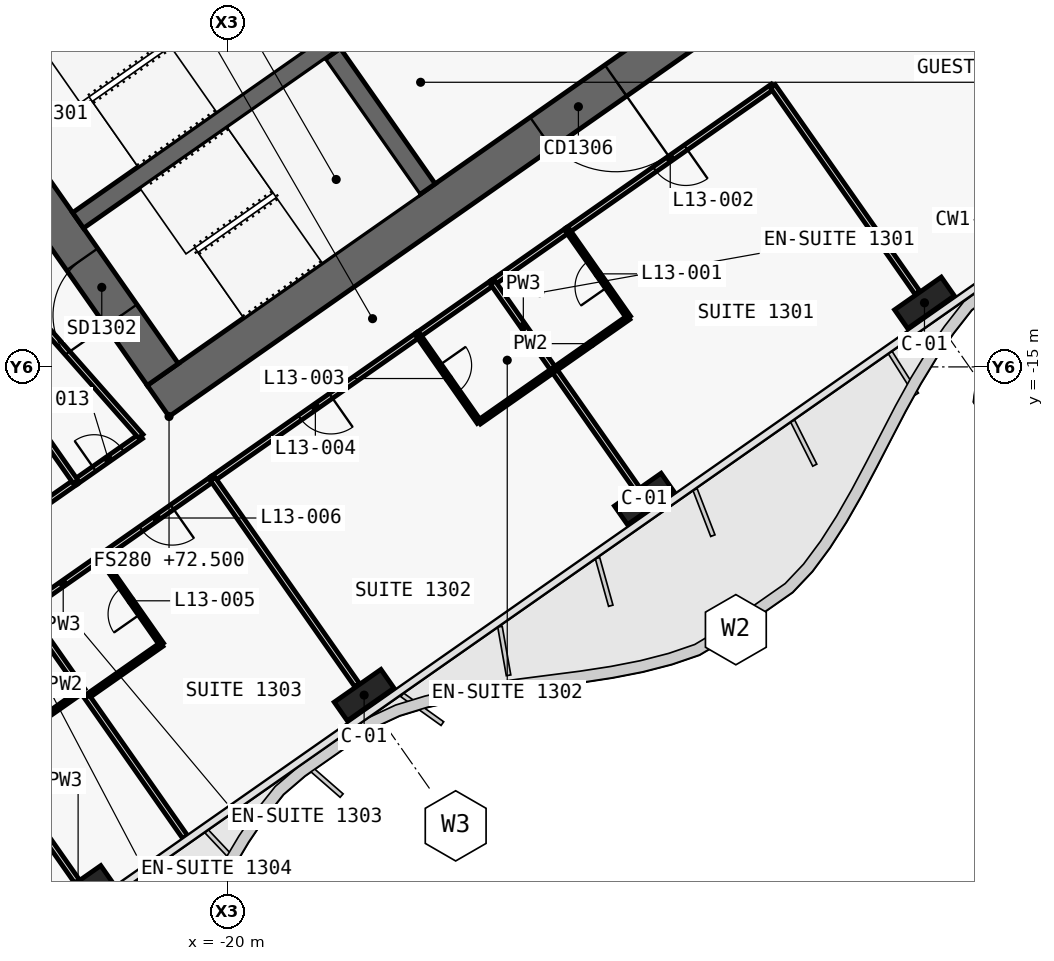
"""IFC4 building model, lengths in metres.
Left out: names, types, materials, properties, quantities, classifications, styles, units other than length and angle.
Written with IfcOpenShell. Run it as: python <this file> out.ifc"""

import sys

from ifc_helpers import new_model, si_unit, direction, frame, frame_2d, origin, origin_2d, place, context, subcontext, project, spatial, polyline, rectangle, outline, extrude, element, fill, save


model = new_model("IFC4")
c1 = context("Model", 3, precision=1e-05, world=origin(), true_north=direction((0.0, 1.0)))
c2 = subcontext(c1, "Body", "Model", "MODEL_VIEW")
j1 = project(units=[si_unit("LENGTHUNIT", "METRE"), si_unit("PLANEANGLEUNIT", "RADIAN")], contexts=[c1])
p1 = place(None, origin())
s1 = spatial("IfcSite", under=j1, at=p1, CompositionType="ELEMENT")
p2 = place(p1, origin())
s2 = spatial("IfcBuilding", under=s1, at=p2, CompositionType="ELEMENT")
p3 = place(p2, frame((0.0, 0.0, 72.5)))
s3 = spatial("IfcBuildingStorey", under=s2, at=p3, CompositionType="ELEMENT", Elevation=72.5)
p4 = place(p3, frame((0.037, 11.867, 0.0), z_axis=(0.0, 0.0, 1.0), x_axis=(-0.819155306259, -0.573571777746, 0.0)))
e1 = element("IfcWall", 1, at=p4, inside=s3, PredefinedType="SHEAR", context=c2, shape_type="SweptSolid", body=[
    extrude(outline(polyline([(33.837, 0.5), (0.7, 0.5), (0.0, -0.5), (33.837, -0.5), (33.837, 0.5)])), origin(), (0.0, 0.0, 1.0), 3.6),
])
p5 = place(p3, frame((0.037, -0.585, 0.0), z_axis=(0.0, 0.0, 1.0), x_axis=(-0.819157152511, -0.573569140985, 0.0)))
e2 = element("IfcWall", 2, at=p5, inside=s3, PredefinedType="SHEAR", context=c2, shape_type="SweptSolid", body=[
    extrude(outline(polyline([(26.695, 0.5), (0.7, 0.5), (0.0, -0.5), (26.695, -0.5), (26.695, 0.5)])), origin(), (0.0, 0.0, 1.0), 3.6),
])
p6 = place(p5, frame((2.995, 0.0, 0.0)))
e3 = element("IfcOpeningElement", 3, at=p6, cuts=e2, PredefinedType="OPENING", context=c2, shape_type="SweptSolid", body=[
    extrude(rectangle(XDim=2.4, YDim=2.1, at=frame_2d((1.2, 1.05))), frame((0.0, 0.51, 0.0), z_axis=(0.0, -1.0, 0.0), x_axis=(1.0, 0.0, 0.0)), (0.0, 0.0, 1.0), 1.02),
])
p7 = place(p5, frame((11.995, 0.0, 0.0)))
e4 = element("IfcOpeningElement", 4, at=p7, cuts=e2, PredefinedType="OPENING", context=c2, shape_type="SweptSolid", body=[
    extrude(rectangle(XDim=2.4, YDim=2.1, at=frame_2d((1.2, 1.05))), frame((0.0, 0.51, 0.0), z_axis=(0.0, -1.0, 0.0), x_axis=(1.0, 0.0, 0.0)), (0.0, 0.0, 1.0), 1.02),
])
p8 = place(p3, frame((-21.708, -15.2, 0.0), z_axis=(0.0, 0.0, 1.0), x_axis=(-0.573576324356, 0.819152122709, 0.0)))
e5 = element("IfcWall", 5, at=p8, inside=s3, PredefinedType="SHEAR", context=c2, shape_type="SweptSolid", body=[
    extrude(outline(polyline([(0.0, 0.5), (0.0, -0.5), (9.2, -0.5), (9.2, 0.5), (0.0, 0.5)])), origin(), (0.0, 0.0, 1.0), 3.6),
])
p9 = place(p8, frame((6.1, 0.0, 0.0)))
e6 = element("IfcOpeningElement", 6, at=p9, cuts=e5, PredefinedType="OPENING", context=c2, shape_type="SweptSolid", body=[
    extrude(rectangle(XDim=1.8, YDim=2.1, at=frame_2d((0.9, 1.05))), frame((0.0, 0.51, 0.0), z_axis=(0.0, -1.0, 0.0), x_axis=(1.0, 0.0, 0.0)), (0.0, 0.0, 1.0), 1.02),
])
p10 = place(p8, frame((1.9, 0.0, 0.0)))
e7 = element("IfcOpeningElement", 7, at=p10, cuts=e5, PredefinedType="OPENING", context=c2, shape_type="SweptSolid", body=[
    extrude(rectangle(XDim=1.8, YDim=2.1, at=frame_2d((0.9, 1.05))), frame((0.0, 0.51, 0.0), z_axis=(0.0, -1.0, 0.0), x_axis=(1.0, 0.0, 0.0)), (0.0, 0.0, 1.0), 1.02),
])
p11 = place(p3, frame((-14.745, -10.324, 0.0), z_axis=(0.0, 0.0, 1.0), x_axis=(-0.57356780395, 0.819158088694, 0.0)))
e8 = element("IfcWall", 8, at=p11, inside=s3, PredefinedType="SHEAR", context=c2, shape_type="SweptSolid", body=[
    extrude(outline(polyline([(4.35, 0.25), (0.0, 0.25), (0.0, -0.25), (4.35, -0.25), (4.35, 0.25)])), origin(), (0.0, 0.0, 1.0), 3.6),
])
p12 = place(p3, frame((-2.638, 3.768, 0.0), z_axis=(0.0, 0.0, 1.0), x_axis=(-0.819148977158, -0.573580816643, 0.0)))
e9 = element("IfcWall", 9, at=p12, inside=s3, PredefinedType="SHEAR", context=c2, shape_type="SweptSolid", body=[
    extrude(outline(polyline([(26.0, 0.25), (0.0, 0.25), (0.0, -0.25), (26.0, -0.25), (26.0, 0.25)])), origin(), (0.0, 0.0, 1.0), 3.6),
])
p13 = place(p12, frame((1.169, 0.0, 0.0)))
e10 = element("IfcOpeningElement", 10, at=p13, cuts=e9, PredefinedType="OPENING", context=c2, shape_type="SweptSolid", body=[
    extrude(rectangle(XDim=1.1, YDim=2.1, at=frame_2d((0.55, 1.05))), frame((0.0, 0.26, 0.0), z_axis=(0.0, -1.0, 0.0), x_axis=(1.0, 0.0, 0.0)), (0.0, 0.0, 1.0), 0.52),
])
p14 = place(p12, frame((3.206, 0.0, 0.0)))
e11 = element("IfcOpeningElement", 11, at=p14, cuts=e9, PredefinedType="OPENING", context=c2, shape_type="SweptSolid", body=[
    extrude(rectangle(XDim=1.1, YDim=2.1, at=frame_2d((0.55, 1.05))), frame((0.0, 0.26, 0.0), z_axis=(0.0, -1.0, 0.0), x_axis=(1.0, 0.0, 0.0)), (0.0, 0.0, 1.0), 0.52),
])
p15 = place(p12, frame((5.244, 0.0, 0.0)))
e12 = element("IfcOpeningElement", 12, at=p15, cuts=e9, PredefinedType="OPENING", context=c2, shape_type="SweptSolid", body=[
    extrude(rectangle(XDim=1.1, YDim=2.1, at=frame_2d((0.55, 1.05))), frame((0.0, 0.26, 0.0), z_axis=(0.0, -1.0, 0.0), x_axis=(1.0, 0.0, 0.0)), (0.0, 0.0, 1.0), 0.52),
])
p16 = place(p12, frame((7.281, 0.0, 0.0)))
e13 = element("IfcOpeningElement", 13, at=p16, cuts=e9, PredefinedType="OPENING", context=c2, shape_type="SweptSolid", body=[
    extrude(rectangle(XDim=1.1, YDim=2.1, at=frame_2d((0.55, 1.05))), frame((0.0, 0.26, 0.0), z_axis=(0.0, -1.0, 0.0), x_axis=(1.0, 0.0, 0.0)), (0.0, 0.0, 1.0), 0.52),
])
p17 = place(p12, frame((9.688, 0.0, 0.0)))
e14 = element("IfcOpeningElement", 14, at=p17, cuts=e9, PredefinedType="OPENING", context=c2, shape_type="SweptSolid", body=[
    extrude(rectangle(XDim=1.1, YDim=2.1, at=frame_2d((0.55, 1.05))), frame((0.0, 0.26, 0.0), z_axis=(0.0, -1.0, 0.0), x_axis=(1.0, 0.0, 0.0)), (0.0, 0.0, 1.0), 0.52),
])
p18 = place(p12, frame((11.863, 0.0, 0.0)))
e15 = element("IfcOpeningElement", 15, at=p18, cuts=e9, PredefinedType="OPENING", context=c2, shape_type="SweptSolid", body=[
    extrude(rectangle(XDim=1.1, YDim=2.1, at=frame_2d((0.55, 1.05))), frame((0.0, 0.26, 0.0), z_axis=(0.0, -1.0, 0.0), x_axis=(1.0, 0.0, 0.0)), (0.0, 0.0, 1.0), 0.52),
])
p19 = place(p12, frame((14.038, 0.0, 0.0)))
e16 = element("IfcOpeningElement", 16, at=p19, cuts=e9, PredefinedType="OPENING", context=c2, shape_type="SweptSolid", body=[
    extrude(rectangle(XDim=1.1, YDim=2.1, at=frame_2d((0.55, 1.05))), frame((0.0, 0.26, 0.0), z_axis=(0.0, -1.0, 0.0), x_axis=(1.0, 0.0, 0.0)), (0.0, 0.0, 1.0), 0.52),
])
p20 = place(p12, frame((16.212, 0.0, 0.0)))
e17 = element("IfcOpeningElement", 17, at=p20, cuts=e9, PredefinedType="OPENING", context=c2, shape_type="SweptSolid", body=[
    extrude(rectangle(XDim=1.1, YDim=2.1, at=frame_2d((0.55, 1.05))), frame((0.0, 0.26, 0.0), z_axis=(0.0, -1.0, 0.0), x_axis=(1.0, 0.0, 0.0)), (0.0, 0.0, 1.0), 0.52),
])
for number, where, z_axis, x_axis in (
    (18, (-1.665, -13.313, 0.0), (0.0, 0.0, 1.0), (-0.819, -0.574, 0.0)),
    (19, (-9.038, -18.475, 0.0), (0.0, 0.0, 1.0), (-0.819, -0.574, 0.0)),
    (20, (-16.41, -23.637, 0.0), (0.0, 0.0, 1.0), (-0.819, -0.574, 0.0)),
    (21, (-23.782, -28.799, 0.0), (0.0, 0.0, 1.0), (-0.819, -0.574, 0.0)),
):
    element("IfcColumn", number, at=place(p3, frame(where, z_axis=z_axis, x_axis=x_axis)), inside=s3, PredefinedType="COLUMN", context=c2, shape_type="SweptSolid", body=[
        extrude(rectangle(XDim=1.5, YDim=0.6, at=origin_2d()), origin(), (0.0, 0.0, 1.0), 3.6),
    ])
p21 = place(p3, frame((-24.003, -18.028, 0.0), z_axis=(0.0, 0.0, 1.0), x_axis=(0.819160859995, 0.573563846013, 0.0)))
e22 = element("IfcWall", 22, at=p21, inside=s3, PredefinedType="PARTITIONING", context=c2, shape_type="SweptSolid", body=[
    extrude(rectangle(XDim=2.098, YDim=0.15, at=frame_2d((1.049, 0.0))), origin(), (0.0, 0.0, 1.0), 3.32),
])
p22 = place(p21, frame((0.599, 0.0, 0.0)))
e23 = element("IfcOpeningElement", 23, at=p22, cuts=e22, PredefinedType="OPENING", context=c2, shape_type="SweptSolid", body=[
    extrude(rectangle(XDim=0.9, YDim=2.1, at=frame_2d((0.45, 1.05))), frame((0.0, 0.085, 0.0), z_axis=(0.0, -1.0, 0.0), x_axis=(1.0, 0.0, 0.0)), (0.0, 0.0, 1.0), 0.17),
])
p23 = place(p3, frame((-26.46, -19.748, 0.0), z_axis=(0.0, 0.0, 1.0), x_axis=(0.819193738533, 0.573516886193, 0.0)))
e24 = element("IfcWall", 24, at=p23, inside=s3, PredefinedType="PARTITIONING", context=c2, shape_type="SweptSolid", body=[
    extrude(rectangle(XDim=3.004, YDim=0.15, at=frame_2d((1.502, 0.0))), origin(), (0.0, 0.0, 1.0), 3.32),
])
p24 = place(p23, frame((1.052, 0.0, 0.0)))
e25 = element("IfcOpeningElement", 25, at=p24, cuts=e24, PredefinedType="OPENING", context=c2, shape_type="SweptSolid", body=[
    extrude(rectangle(XDim=0.9, YDim=2.1, at=frame_2d((0.45, 1.05))), frame((0.0, 0.085, 0.0), z_axis=(0.0, -1.0, 0.0), x_axis=(1.0, 0.0, 0.0)), (0.0, 0.0, 1.0), 0.17),
])
p25 = place(p3, frame((-5.652, -7.62, 0.0), z_axis=(0.0, 0.0, 1.0), x_axis=(-0.819155459934, -0.573571558274, 0.0)))
e26 = element("IfcWall", 26, at=p25, inside=s3, PredefinedType="PARTITIONING", context=c2, shape_type="SweptSolid", body=[
    extrude(rectangle(XDim=6.601, YDim=0.15, at=frame_2d((3.301, 0.0))), origin(), (0.0, 0.0, 1.0), 2.6),
])
p26 = place(p25, frame((2.8, 0.0, 0.0)))
e27 = element("IfcOpeningElement", 27, at=p26, cuts=e26, PredefinedType="OPENING", context=c2, shape_type="SweptSolid", body=[
    extrude(rectangle(XDim=1.0, YDim=2.1, at=frame_2d((0.5, 1.05))), frame((0.0, 0.085, 0.0), z_axis=(0.0, -1.0, 0.0), x_axis=(1.0, 0.0, 0.0)), (0.0, 0.0, 1.0), 0.17),
])
p27 = place(p3, frame((-11.056, -11.404, 0.0), z_axis=(0.0, 0.0, 1.0), x_axis=(-0.819146032251, -0.573585022335, 0.0)))
e28 = element("IfcWall", 28, at=p27, inside=s3, PredefinedType="PARTITIONING", context=c2, shape_type="SweptSolid", body=[
    extrude(rectangle(XDim=2.404, YDim=0.15, at=frame_2d((1.202, 0.0))), origin(), (0.0, 0.0, 1.0), 2.6),
])
p28 = place(p3, frame((-14.989, -14.158, 0.0), z_axis=(0.0, 0.0, 1.0), x_axis=(-0.819124209701, -0.57361618621, 0.0)))
e29 = element("IfcWall", 29, at=p28, inside=s3, PredefinedType="PARTITIONING", context=c2, shape_type="SweptSolid", body=[
    extrude(rectangle(XDim=6.603, YDim=0.15, at=frame_2d((3.302, 0.0))), origin(), (0.0, 0.0, 1.0), 2.6),
])
p29 = place(p28, frame((2.801, 0.0, 0.0)))
e30 = element("IfcOpeningElement", 30, at=p29, cuts=e29, PredefinedType="OPENING", context=c2, shape_type="SweptSolid", body=[
    extrude(rectangle(XDim=1.0, YDim=2.1, at=frame_2d((0.5, 1.05))), frame((0.0, 0.085, 0.0), z_axis=(0.0, -1.0, 0.0), x_axis=(1.0, 0.0, 0.0)), (0.0, 0.0, 1.0), 0.17),
])
p30 = place(p3, frame((-13.022, -12.781, 0.0), z_axis=(0.0, 0.0, 1.0), x_axis=(-0.819146032251, -0.573585022335, 0.0)))
e31 = element("IfcWall", 31, at=p30, inside=s3, PredefinedType="PARTITIONING", context=c2, shape_type="SweptSolid", body=[
    extrude(rectangle(XDim=2.404, YDim=0.15, at=frame_2d((1.202, 0.0))), origin(), (0.0, 0.0, 1.0), 2.6),
])
p31 = place(p3, frame((-20.395, -17.943, 0.0), z_axis=(0.0, 0.0, 1.0), x_axis=(-0.819145961204, -0.573585123798, 0.0)))
e32 = element("IfcWall", 32, at=p31, inside=s3, PredefinedType="PARTITIONING", context=c2, shape_type="SweptSolid", body=[
    extrude(rectangle(XDim=3.603, YDim=0.15, at=frame_2d((1.802, 0.0))), origin(), (0.0, 0.0, 1.0), 2.6),
])
p32 = place(p31, frame((1.302, 0.0, 0.0)))
e33 = element("IfcOpeningElement", 33, at=p32, cuts=e32, PredefinedType="OPENING", context=c2, shape_type="SweptSolid", body=[
    extrude(rectangle(XDim=1.0, YDim=2.1, at=frame_2d((0.5, 1.05))), frame((0.0, 0.085, 0.0), z_axis=(0.0, -1.0, 0.0), x_axis=(1.0, 0.0, 0.0)), (0.0, 0.0, 1.0), 0.17),
])
p33 = place(p3, frame((-23.344, -20.008, 0.0), z_axis=(0.0, 0.0, 1.0), x_axis=(-0.819146032251, -0.573585022335, 0.0)))
e34 = element("IfcWall", 34, at=p33, inside=s3, PredefinedType="PARTITIONING", context=c2, shape_type="SweptSolid", body=[
    extrude(rectangle(XDim=2.404, YDim=0.15, at=frame_2d((1.202, 0.0))), origin(), (0.0, 0.0, 1.0), 3.32),
])
p34 = place(p3, frame((-1.849, -13.051, 0.0), z_axis=(0.0, 0.0, 1.0), x_axis=(-0.573575988258, 0.819152358047, 0.0)))
e35 = element("IfcWall", 35, at=p34, inside=s3, PredefinedType="PARTITIONING", context=c2, shape_type="SweptSolid", body=[
    extrude(rectangle(XDim=6.632, YDim=0.15, at=frame_2d((3.316, 0.0))), origin(), (0.0, 0.0, 1.0), 2.6),
])
p35 = place(p3, frame((-22.284, -16.827, 0.0), z_axis=(0.0, 0.0, 1.0), x_axis=(-0.661545117561, 0.749905365651, 0.0)))
e36 = element("IfcWall", 36, at=p35, inside=s3, PredefinedType="PARTITIONING", context=c2, shape_type="SweptSolid", body=[
    extrude(rectangle(XDim=6.543, YDim=0.15, at=frame_2d((3.271, 0.0))), origin(), (0.0, 0.0, 1.0), 2.6),
])
p36 = place(p3, frame((-24.001, -18.026, 0.0), z_axis=(0.0, 0.0, 1.0), x_axis=(-0.573581240749, 0.819148680192, 0.0)))
e37 = element("IfcWall", 37, at=p36, inside=s3, PredefinedType="PARTITIONING", context=c2, shape_type="SweptSolid", body=[
    extrude(rectangle(XDim=11.3, YDim=0.15, at=frame_2d((5.65, 0.0))), origin(), (0.0, 0.0, 1.0), 2.6),
])
p37 = place(p3, frame((-11.417, -15.076, 0.0), z_axis=(0.0, 0.0, 1.0), x_axis=(0.819141114317, 0.573592045652, 0.0)))
e38 = element("IfcWall", 38, at=p37, inside=s3, PredefinedType="PARTITIONING", context=c2, shape_type="SweptSolid", body=[
    extrude(rectangle(XDim=2.4, YDim=0.12, at=frame_2d((1.2, 0.0))), origin(), (0.0, 0.0, 1.0), 2.6),
])
p38 = place(p3, frame((-9.451, -13.698, 0.0), z_axis=(0.0, 0.0, 1.0), x_axis=(-0.573591086599, 0.819141785879, 0.0)))
e39 = element("IfcWall", 39, at=p38, inside=s3, PredefinedType="PARTITIONING", context=c2, shape_type="SweptSolid", body=[
    extrude(rectangle(XDim=2.8, YDim=0.12, at=frame_2d((1.4, 0.0))), origin(), (0.0, 0.0, 1.0), 3.32),
])
p39 = place(p38, frame((0.975, 0.0, 0.0)))
e40 = element("IfcOpeningElement", 40, at=p39, cuts=e39, PredefinedType="OPENING", context=c2, shape_type="SweptSolid", body=[
    extrude(rectangle(XDim=0.85, YDim=2.05, at=frame_2d((0.425, 1.025))), frame((0.0, 0.07, 0.0), z_axis=(0.0, -1.0, 0.0), x_axis=(1.0, 0.0, 0.0)), (0.0, 0.0, 1.0), 0.14),
])
p40 = place(p3, frame((-9.221, -18.213, 0.0), z_axis=(0.0, 0.0, 1.0), x_axis=(-0.573594994199, 0.819139049631, 0.0)))
e41 = element("IfcWall", 41, at=p40, inside=s3, PredefinedType="PARTITIONING", context=c2, shape_type="SweptSolid", body=[
    extrude(rectangle(XDim=3.829, YDim=0.15, at=frame_2d((1.915, 0.0))), origin(), (0.0, 0.0, 1.0), 2.6),
])
p41 = place(p3, frame((-11.418, -15.075, 0.0), z_axis=(0.0, 0.0, 1.0), x_axis=(-0.573550118428, 0.819170471667, 0.0)))
e42 = element("IfcWall", 42, at=p41, inside=s3, PredefinedType="PARTITIONING", context=c2, shape_type="SweptSolid", body=[
    extrude(rectangle(XDim=2.8, YDim=0.15, at=frame_2d((1.4, 0.0))), origin(), (0.0, 0.0, 1.0), 2.6),
])
p42 = place(p3, frame((-14.991, -14.159, 0.0), z_axis=(0.0, 0.0, 1.0), x_axis=(0.573550118428, -0.819170471667, 0.0)))
e43 = element("IfcWall", 43, at=p42, inside=s3, PredefinedType="PARTITIONING", context=c2, shape_type="SweptSolid", body=[
    extrude(rectangle(XDim=2.8, YDim=0.12, at=frame_2d((1.4, 0.0))), origin(), (0.0, 0.0, 1.0), 3.32),
])
p43 = place(p42, frame((0.975, 0.0, 0.0)))
e44 = element("IfcOpeningElement", 44, at=p43, cuts=e43, PredefinedType="OPENING", context=c2, shape_type="SweptSolid", body=[
    extrude(rectangle(XDim=0.85, YDim=2.05, at=frame_2d((0.425, 1.025))), frame((0.0, 0.07, 0.0), z_axis=(0.0, -1.0, 0.0), x_axis=(1.0, 0.0, 0.0)), (0.0, 0.0, 1.0), 0.14),
])
p44 = place(p3, frame((-13.383, -16.453, 0.0), z_axis=(0.0, 0.0, 1.0), x_axis=(0.819155442668, 0.573571582932, 0.0)))
e45 = element("IfcWall", 45, at=p44, inside=s3, PredefinedType="PARTITIONING", context=c2, shape_type="SweptSolid", body=[
    extrude(rectangle(XDim=2.4, YDim=0.12, at=frame_2d((1.2, 0.0))), origin(), (0.0, 0.0, 1.0), 2.6),
])
p45 = place(p3, frame((-16.594, -23.375, 0.0), z_axis=(0.0, 0.0, 1.0), x_axis=(-0.57359826181, 0.819136761505, 0.0)))
e46 = element("IfcWall", 46, at=p45, inside=s3, PredefinedType="PARTITIONING", context=c2, shape_type="SweptSolid", body=[
    extrude(rectangle(XDim=6.63, YDim=0.15, at=frame_2d((3.315, 0.0))), origin(), (0.0, 0.0, 1.0), 2.6),
])
p46 = place(p3, frame((-23.705, -23.68, 0.0), z_axis=(0.0, 0.0, 1.0), x_axis=(0.819107643868, 0.573639841501, 0.0)))
e47 = element("IfcWall", 47, at=p46, inside=s3, PredefinedType="PARTITIONING", context=c2, shape_type="SweptSolid", body=[
    extrude(rectangle(XDim=2.4, YDim=0.12, at=frame_2d((1.2, 0.0))), origin(), (0.0, 0.0, 1.0), 3.32),
])
p47 = place(p3, frame((-21.739, -22.302, 0.0), z_axis=(0.0, 0.0, 1.0), x_axis=(-0.573550118428, 0.819170471667, 0.0)))
e48 = element("IfcWall", 48, at=p47, inside=s3, PredefinedType="PARTITIONING", context=c2, shape_type="SweptSolid", body=[
    extrude(rectangle(XDim=2.8, YDim=0.12, at=frame_2d((1.4, 0.0))), origin(), (0.0, 0.0, 1.0), 3.32),
])
p48 = place(p47, frame((0.975, 0.0, 0.0)))
e49 = element("IfcOpeningElement", 49, at=p48, cuts=e48, PredefinedType="OPENING", context=c2, shape_type="SweptSolid", body=[
    extrude(rectangle(XDim=0.85, YDim=2.05, at=frame_2d((0.425, 1.025))), frame((0.0, 0.07, 0.0), z_axis=(0.0, -1.0, 0.0), x_axis=(1.0, 0.0, 0.0)), (0.0, 0.0, 1.0), 0.14),
])
p49 = place(p3, frame((-21.124, -27.365, 0.0), z_axis=(0.0, 0.0, 1.0), x_axis=(-0.573553393703, 0.819168178442, 0.0)))
e50 = element("IfcWall", 50, at=p49, inside=s3, PredefinedType="PARTITIONING", context=c2, shape_type="SweptSolid", body=[
    extrude(rectangle(XDim=4.499, YDim=0.15, at=frame_2d((2.25, 0.0))), origin(), (0.0, 0.0, 1.0), 2.5),
])
p50 = place(p3, frame((-23.819, -23.517, 0.0), z_axis=(0.0, 0.0, 1.0), x_axis=(-0.573588285102, 0.819143747577, 0.0)))
e51 = element("IfcWall", 51, at=p50, inside=s3, PredefinedType="PARTITIONING", context=c2, shape_type="SweptSolid", body=[
    extrude(rectangle(XDim=2.602, YDim=0.15, at=frame_2d((1.301, 0.0))), origin(), (0.0, 0.0, 1.0), 3.32),
])
p51 = place(p3, frame((-25.13, -24.434, 0.0), z_axis=(0.0, 0.0, 1.0), x_axis=(0.81918174131, 0.573534022273, 0.0)))
e52 = element("IfcWall", 52, at=p51, inside=s3, PredefinedType="PARTITIONING", context=c2, shape_type="SweptSolid", body=[
    extrude(rectangle(XDim=1.6, YDim=0.12, at=frame_2d((0.8, 0.0))), origin(), (0.0, 0.0, 1.0), 3.32),
])
p52 = place(p3, frame((-23.966, -28.537, 0.0), z_axis=(0.0, 0.0, 1.0), x_axis=(-0.57359826181, 0.819136761505, 0.0)))
e53 = element("IfcWall", 53, at=p52, inside=s3, PredefinedType="PARTITIONING", context=c2, shape_type="SweptSolid", body=[
    extrude(rectangle(XDim=6.63, YDim=0.15, at=frame_2d((3.315, 0.0))), origin(), (0.0, 0.0, 1.0), 2.6),
])
p53 = place(p7, origin())
e54 = element("IfcDoor", 54, at=p53, inside=s3, OperationType="DOUBLE_DOOR_SINGLE_SWING", PredefinedType="DOOR", context=c2, shape_type="SweptSolid", body=[
    extrude(rectangle(XDim=2.4, YDim=2.1, at=frame_2d((1.2, 1.05))), frame((0.0, 0.025, 0.0), z_axis=(0.0, -1.0, 0.0), x_axis=(1.0, 0.0, 0.0)), (0.0, 0.0, 1.0), 0.05),
])
fill(e4, e54)
p54 = place(p10, origin())
e55 = element("IfcDoor", 55, at=p54, inside=s3, OperationType="DOUBLE_DOOR_SINGLE_SWING", PredefinedType="DOOR", context=c2, shape_type="SweptSolid", body=[
    extrude(rectangle(XDim=1.8, YDim=2.1, at=frame_2d((0.9, 1.05))), frame((0.0, 0.025, 0.0), z_axis=(0.0, -1.0, 0.0), x_axis=(1.0, 0.0, 0.0)), (0.0, 0.0, 1.0), 0.05),
])
fill(e7, e55)
p55 = place(p39, origin())
e56 = element("IfcDoor", 56, at=p55, inside=s3, OperationType="SINGLE_SWING_LEFT", PredefinedType="DOOR", context=c2, shape_type="SweptSolid", body=[
    extrude(rectangle(XDim=0.85, YDim=2.05, at=frame_2d((0.425, 1.025))), frame((0.0, 0.025, 0.0), z_axis=(0.0, -1.0, 0.0), x_axis=(1.0, 0.0, 0.0)), (0.0, 0.0, 1.0), 0.05),
])
fill(e40, e56)
p56 = place(p26, origin())
e57 = element("IfcDoor", 57, at=p56, inside=s3, OperationType="SINGLE_SWING_LEFT", PredefinedType="DOOR", context=c2, shape_type="SweptSolid", body=[
    extrude(rectangle(XDim=1.0, YDim=2.1, at=frame_2d((0.5, 1.05))), frame((0.0, 0.025, 0.0), z_axis=(0.0, -1.0, 0.0), x_axis=(1.0, 0.0, 0.0)), (0.0, 0.0, 1.0), 0.05),
])
fill(e27, e57)
p57 = place(p43, origin())
e58 = element("IfcDoor", 58, at=p57, inside=s3, OperationType="SINGLE_SWING_LEFT", PredefinedType="DOOR", context=c2, shape_type="SweptSolid", body=[
    extrude(rectangle(XDim=0.85, YDim=2.05, at=frame_2d((0.425, 1.025))), frame((0.0, 0.025, 0.0), z_axis=(0.0, -1.0, 0.0), x_axis=(1.0, 0.0, 0.0)), (0.0, 0.0, 1.0), 0.05),
])
fill(e44, e58)
p58 = place(p29, origin())
e59 = element("IfcDoor", 59, at=p58, inside=s3, OperationType="SINGLE_SWING_LEFT", PredefinedType="DOOR", context=c2, shape_type="SweptSolid", body=[
    extrude(rectangle(XDim=1.0, YDim=2.1, at=frame_2d((0.5, 1.05))), frame((0.0, 0.025, 0.0), z_axis=(0.0, -1.0, 0.0), x_axis=(1.0, 0.0, 0.0)), (0.0, 0.0, 1.0), 0.05),
])
fill(e30, e59)
p59 = place(p48, origin())
e60 = element("IfcDoor", 60, at=p59, inside=s3, OperationType="SINGLE_SWING_LEFT", PredefinedType="DOOR", context=c2, shape_type="SweptSolid", body=[
    extrude(rectangle(XDim=0.85, YDim=2.05, at=frame_2d((0.425, 1.025))), frame((0.0, 0.025, 0.0), z_axis=(0.0, -1.0, 0.0), x_axis=(1.0, 0.0, 0.0)), (0.0, 0.0, 1.0), 0.05),
])
fill(e49, e60)
p60 = place(p32, origin())
e61 = element("IfcDoor", 61, at=p60, inside=s3, OperationType="SINGLE_SWING_RIGHT", PredefinedType="DOOR", context=c2, shape_type="SweptSolid", body=[
    extrude(rectangle(XDim=1.0, YDim=2.1, at=frame_2d((0.5, 1.05))), frame((0.0, 0.025, 0.0), z_axis=(0.0, -1.0, 0.0), x_axis=(1.0, 0.0, 0.0)), (0.0, 0.0, 1.0), 0.05),
])
fill(e33, e61)
p61 = place(p22, origin())
e62 = element("IfcDoor", 62, at=p61, inside=s3, OperationType="SINGLE_SWING_LEFT", PredefinedType="DOOR", context=c2, shape_type="SweptSolid", body=[
    extrude(rectangle(XDim=0.9, YDim=2.1, at=frame_2d((0.45, 1.05))), frame((0.0, 0.025, 0.0), z_axis=(0.0, -1.0, 0.0), x_axis=(1.0, 0.0, 0.0)), (0.0, 0.0, 1.0), 0.05),
])
fill(e23, e62)
save(model, sys.argv[1])
